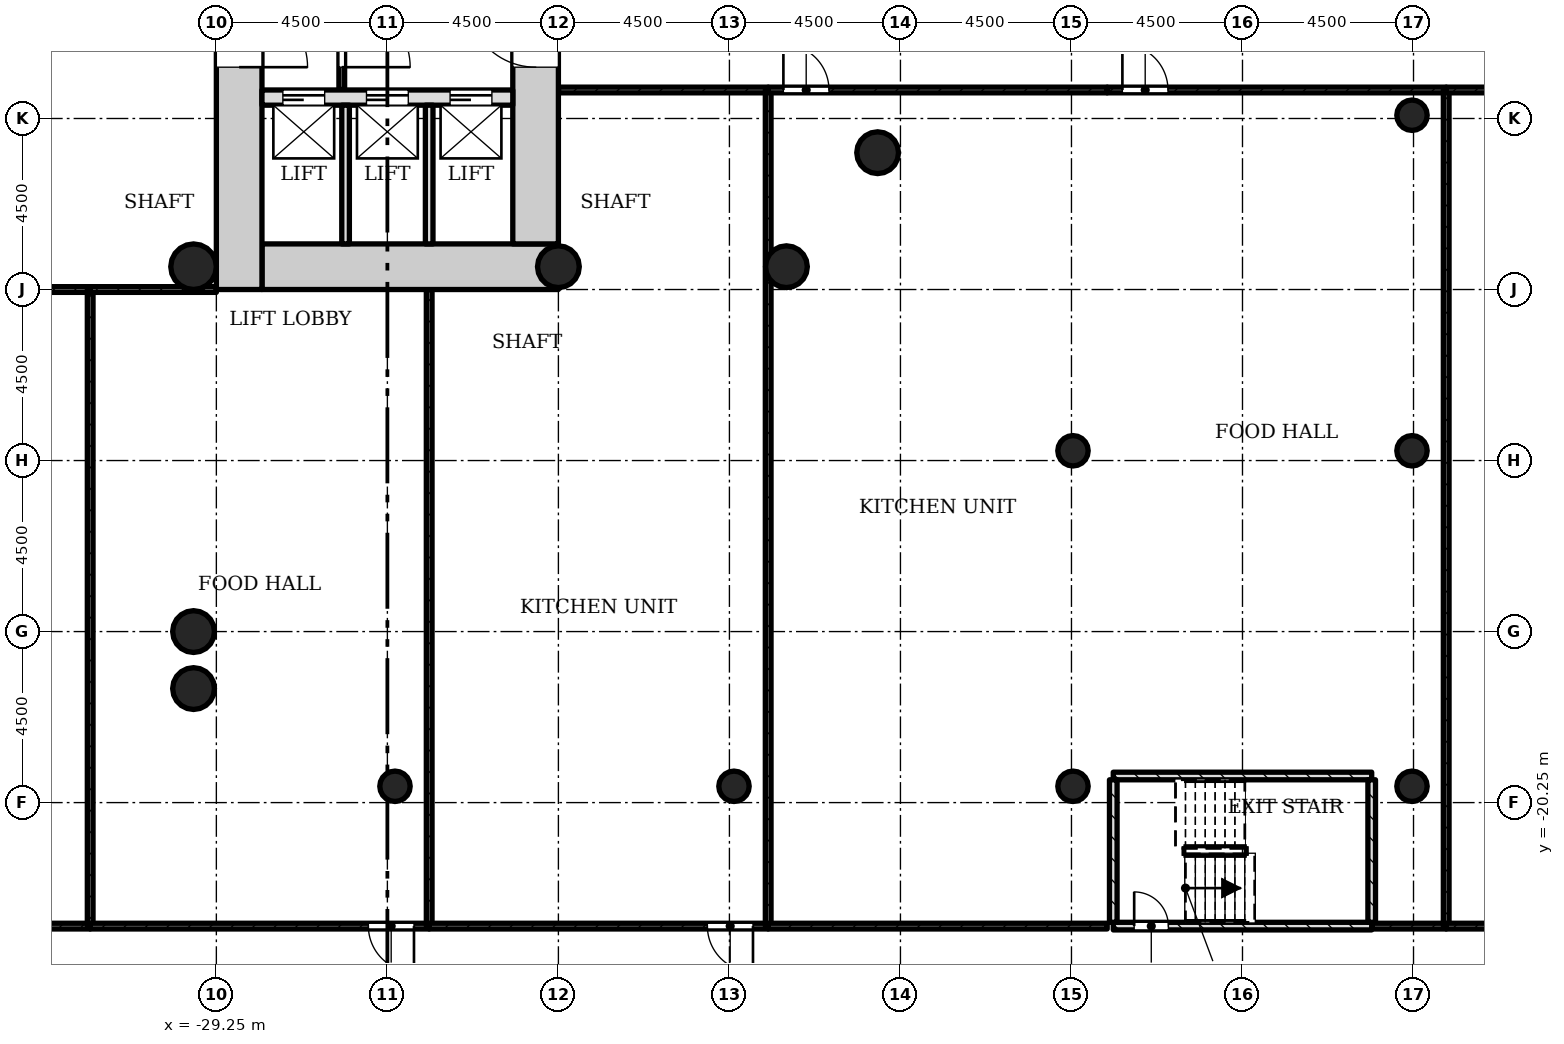
"""IFC4 building model, lengths in metres.
Left out: names, types, materials, properties, quantities, classifications, styles, units other than length and angle.
Written with IfcOpenShell. Run it as: python <this file> out.ifc"""

import sys

from ifc_helpers import new_model, si_unit, direction, frame, frame_2d, origin, origin_2d, place, context, subcontext, project, spatial, rectangle, hollow_circle, extrude, element, fill, save


model = new_model("IFC4")
c1 = context("Model", 3, precision=1e-05, world=origin(), true_north=direction((0.0, 1.0)))
c2 = subcontext(c1, "Body", "Model", "MODEL_VIEW")
j1 = project(units=[si_unit("LENGTHUNIT", "METRE"), si_unit("PLANEANGLEUNIT", "RADIAN")], contexts=[c1])
p1 = place(None, origin())
s1 = spatial("IfcSite", under=j1, at=p1, CompositionType="ELEMENT")
p2 = place(p1, origin())
s2 = spatial("IfcBuilding", under=s1, at=p2, CompositionType="ELEMENT")
p3 = place(p2, frame((0.0, 0.0, 6.0)))
s3 = spatial("IfcBuildingStorey", under=s2, at=p3, CompositionType="ELEMENT", Elevation=6.0)
p4 = place(p3, frame((-28.05, -6.15, 0.0), z_axis=(0.0, 0.0, 1.0), x_axis=(1.0, 0.0, 0.0)))
e1 = element("IfcWall", 1, at=p4, inside=s3, PredefinedType="SHEAR", context=c2, shape_type="SweptSolid", body=[
    extrude(rectangle(XDim=7.8, YDim=1.2, at=frame_2d((3.9, 0.0))), origin(), (0.0, 0.0, 1.0), 5.0),
])
p5 = place(p3, frame((-20.85, -5.55, 0.0), z_axis=(0.0, 0.0, 1.0), x_axis=(0.0, 1.0, 0.0)))
e2 = element("IfcWall", 2, at=p5, inside=s3, PredefinedType="SHEAR", context=c2, shape_type="SweptSolid", body=[
    extrude(rectangle(XDim=12.3, YDim=1.2, at=frame_2d((6.15, 0.0))), origin(), (0.0, 0.0, 1.0), 5.0),
])
p6 = place(p5, frame((4.65, 0.0, 0.0)))
e3 = element("IfcOpeningElement", 3, at=p6, cuts=e2, PredefinedType="OPENING", context=c2, shape_type="SweptSolid", body=[
    extrude(rectangle(XDim=1.8, YDim=2.1, at=frame_2d((0.9, 1.05))), frame((0.0, 0.61, 0.0), z_axis=(0.0, -1.0, 0.0), x_axis=(1.0, 0.0, 0.0)), (0.0, 0.0, 1.0), 1.22),
])
p7 = place(p3, frame((-28.65, 5.55, 0.0), z_axis=(0.0, 0.0, 1.0), x_axis=(0.0, -1.0, 0.0)))
e4 = element("IfcWall", 4, at=p7, inside=s3, PredefinedType="SHEAR", context=c2, shape_type="SweptSolid", body=[
    extrude(rectangle(XDim=12.3, YDim=1.2, at=frame_2d((6.15, 0.0))), origin(), (0.0, 0.0, 1.0), 5.0),
])
p8 = place(p7, frame((4.65, 0.0, 0.0)))
e5 = element("IfcOpeningElement", 5, at=p8, cuts=e4, PredefinedType="OPENING", context=c2, shape_type="SweptSolid", body=[
    extrude(rectangle(XDim=1.8, YDim=2.1, at=frame_2d((0.9, 1.05))), frame((0.0, 0.61, 0.0), z_axis=(0.0, -1.0, 0.0), x_axis=(1.0, 0.0, 0.0)), (0.0, 0.0, 1.0), 1.22),
])
p9 = place(p3, frame((-28.05, -1.7, 0.0), z_axis=(0.0, 0.0, 1.0), x_axis=(1.0, 0.0, 0.0)))
e6 = element("IfcWall", 6, at=p9, inside=s3, PredefinedType="SHEAR", context=c2, shape_type="SweptSolid", body=[
    extrude(rectangle(XDim=6.6, YDim=0.4, at=frame_2d((3.3, 0.0))), origin(), (0.0, 0.0, 1.0), 5.0),
])
p10 = place(p9, frame((0.55, 0.0, 0.0)))
e7 = element("IfcOpeningElement", 7, at=p10, cuts=e6, PredefinedType="OPENING", context=c2, shape_type="SweptSolid", body=[
    extrude(rectangle(XDim=1.1, YDim=2.1, at=frame_2d((0.55, 1.05))), frame((0.0, 0.21, 0.0), z_axis=(0.0, -1.0, 0.0), x_axis=(1.0, 0.0, 0.0)), (0.0, 0.0, 1.0), 0.42),
])
p11 = place(p9, frame((2.75, 0.0, 0.0)))
e8 = element("IfcOpeningElement", 8, at=p11, cuts=e6, PredefinedType="OPENING", context=c2, shape_type="SweptSolid", body=[
    extrude(rectangle(XDim=1.1, YDim=2.1, at=frame_2d((0.55, 1.05))), frame((0.0, 0.21, 0.0), z_axis=(0.0, -1.0, 0.0), x_axis=(1.0, 0.0, 0.0)), (0.0, 0.0, 1.0), 0.42),
])
p12 = place(p9, frame((4.95, 0.0, 0.0)))
e9 = element("IfcOpeningElement", 9, at=p12, cuts=e6, PredefinedType="OPENING", context=c2, shape_type="SweptSolid", body=[
    extrude(rectangle(XDim=1.1, YDim=2.1, at=frame_2d((0.55, 1.05))), frame((0.0, 0.21, 0.0), z_axis=(0.0, -1.0, 0.0), x_axis=(1.0, 0.0, 0.0)), (0.0, 0.0, 1.0), 0.42),
])
for number, where, z_axis, x_axis in (
    (10, (-20.25, -6.15, 0.0), (0.0, 0.0, 1.0), (1.0, 0.0, 0.0)),
    (11, (-14.25, -6.15, 0.0), (0.0, 0.0, 1.0), (1.0, 0.0, 0.0)),
    (12, (-11.85, -3.15, 0.0), (0.0, 0.0, 1.0), (1.0, 0.0, 0.0)),
    (13, (-29.85, -15.75, 0.0), (0.0, 0.0, 1.0), (1.0, 0.0, 0.0)),
    (14, (-29.85, -17.25, 0.0), (0.0, 0.0, 1.0), (1.0, 0.0, 0.0)),
):
    element("IfcColumn", number, at=place(p3, frame(where, z_axis=z_axis, x_axis=x_axis)), inside=s3, PredefinedType="COLUMN", context=c2, shape_type="SweptSolid", body=[
        extrude(hollow_circle(Radius=0.55, WallThickness=0.04, at=origin_2d()), origin(), (0.0, 0.0, 1.0), 5.0),
    ])
p13 = place(p3, frame((-29.85, -6.15, 0.0), z_axis=(0.0, 0.0, 1.0), x_axis=(1.0, 0.0, 0.0)))
e15 = element("IfcColumn", 15, at=p13, inside=s3, PredefinedType="COLUMN", context=c2, shape_type="SweptSolid", body=[
    extrude(hollow_circle(Radius=0.6, WallThickness=0.045, at=origin_2d()), origin(), (0.0, 0.0, 1.0), 5.0),
])
for number, where, z_axis, x_axis in (
    (16, (-24.55, -19.821, 0.0), (0.0, 0.0, 1.0), (1.0, 0.0, 0.0)),
    (17, (-15.63, -19.821, 0.0), (0.0, 0.0, 1.0), (1.0, 0.0, 0.0)),
    (18, (-6.71, -19.821, 0.0), (0.0, 0.0, 1.0), (1.0, 0.0, 0.0)),
    (19, (2.21, -19.821, 0.0), (0.0, 0.0, 1.0), (1.0, 0.0, 0.0)),
    (20, (-6.71, -10.993, 0.0), (0.0, 0.0, 1.0), (1.0, 0.0, 0.0)),
    (21, (2.21, -10.993, 0.0), (0.0, 0.0, 1.0), (1.0, 0.0, 0.0)),
    (22, (2.21, -2.164, 0.0), (0.0, 0.0, 1.0), (1.0, 0.0, 0.0)),
):
    element("IfcColumn", number, at=place(p3, frame(where, z_axis=z_axis, x_axis=x_axis)), inside=s3, PredefinedType="COLUMN", context=c2, shape_type="SweptSolid", body=[
        extrude(hollow_circle(Radius=0.4, WallThickness=0.028, at=origin_2d()), origin(), (0.0, 0.0, 1.0), 5.0),
    ])
p14 = place(p3, frame((-25.95, -1.5, 0.0), z_axis=(0.0, 0.0, 1.0), x_axis=(0.0, 1.0, 0.0)))
e23 = element("IfcWall", 23, at=p14, inside=s3, PredefinedType="PARTITIONING", context=c2, shape_type="SweptSolid", body=[
    extrude(rectangle(XDim=3.0, YDim=0.15, at=frame_2d((1.5, 0.0))), origin(), (0.0, 0.0, 1.0), 4.58),
])
p15 = place(p14, frame((0.6, 0.0, 0.0)))
e24 = element("IfcOpeningElement", 24, at=p15, cuts=e23, PredefinedType="OPENING", context=c2, shape_type="SweptSolid", body=[
    extrude(rectangle(XDim=1.8, YDim=2.1, at=frame_2d((0.9, 1.05))), frame((0.0, 0.085, 0.0), z_axis=(0.0, -1.0, 0.0), x_axis=(1.0, 0.0, 0.0)), (0.0, 0.0, 1.0), 0.17),
])
for number, where, z_axis, x_axis in (
    (25, (-25.85, -5.55, 0.0), (0.0, 0.0, 1.0), (0.0, 1.0, 0.0)),
    (26, (-23.65, -5.55, 0.0), (0.0, 0.0, 1.0), (0.0, 1.0, 0.0)),
):
    element("IfcWall", number, at=place(p3, frame(where, z_axis=z_axis, x_axis=x_axis)), inside=s3, PredefinedType="SOLIDWALL", context=c2, shape_type="SweptSolid", body=[
        extrude(rectangle(XDim=3.65, YDim=0.2, at=frame_2d((1.825, 0.0))), origin(), (0.0, 0.0, 1.0), 4.58),
    ])
p16 = place(p3, frame((-41.49, -6.75, 0.0), z_axis=(0.0, 0.0, 1.0), x_axis=(1.0, 0.0, 0.0)))
e27 = element("IfcWall", 27, at=p16, inside=s3, PredefinedType="PARTITIONING", context=c2, shape_type="SweptSolid", body=[
    extrude(rectangle(XDim=8.92, YDim=0.15, at=frame_2d((4.46, 0.0))), origin(), (0.0, 0.0, 1.0), 4.58),
])
p17 = place(p16, frame((1.0, 0.0, 0.0)))
e28 = element("IfcOpeningElement", 28, at=p17, cuts=e27, PredefinedType="OPENING", context=c2, shape_type="SweptSolid", body=[
    extrude(rectangle(XDim=1.2, YDim=2.1, at=frame_2d((0.6, 1.05))), frame((0.0, 0.085, 0.0), z_axis=(0.0, -1.0, 0.0), x_axis=(1.0, 0.0, 0.0)), (0.0, 0.0, 1.0), 0.17),
])
p18 = place(p3, frame((-32.57, -23.5, 0.0), z_axis=(0.0, 0.0, 1.0), x_axis=(-1.0, 0.0, 0.0)))
e29 = element("IfcWall", 29, at=p18, inside=s3, PredefinedType="PARTITIONING", context=c2, shape_type="SweptSolid", body=[
    extrude(rectangle(XDim=8.92, YDim=0.15, at=frame_2d((4.46, 0.0))), origin(), (0.0, 0.0, 1.0), 4.58),
])
p19 = place(p3, frame((-32.57, -6.75, 0.0), z_axis=(0.0, 0.0, 1.0), x_axis=(0.0, -1.0, 0.0)))
e30 = element("IfcWall", 30, at=p19, inside=s3, PredefinedType="PARTITIONING", context=c2, shape_type="SweptSolid", body=[
    extrude(rectangle(XDim=16.75, YDim=0.15, at=frame_2d((8.375, 0.0))), origin(), (0.0, 0.0, 1.0), 4.58),
])
p20 = place(p3, frame((-32.57, -6.75, 0.0), z_axis=(0.0, 0.0, 1.0), x_axis=(1.0, 0.0, 0.0)))
e31 = element("IfcWall", 31, at=p20, inside=s3, PredefinedType="PARTITIONING", context=c2, shape_type="SweptSolid", body=[
    extrude(rectangle(XDim=3.32, YDim=0.15, at=frame_2d((1.66, 0.0))), origin(), (0.0, 0.0, 1.0), 4.58),
])
p21 = place(p3, frame((-23.65, -23.5, 0.0), z_axis=(0.0, 0.0, 1.0), x_axis=(-1.0, 0.0, 0.0)))
e32 = element("IfcWall", 32, at=p21, inside=s3, PredefinedType="PARTITIONING", context=c2, shape_type="SweptSolid", body=[
    extrude(rectangle(XDim=8.92, YDim=0.15, at=frame_2d((4.46, 0.0))), origin(), (0.0, 0.0, 1.0), 4.58),
])
p22 = place(p21, frame((0.4, 0.0, 0.0)))
e33 = element("IfcOpeningElement", 33, at=p22, cuts=e32, PredefinedType="OPENING", context=c2, shape_type="SweptSolid", body=[
    extrude(rectangle(XDim=1.2, YDim=2.1, at=frame_2d((0.6, 1.05))), frame((0.0, 0.085, 0.0), z_axis=(0.0, -1.0, 0.0), x_axis=(1.0, 0.0, 0.0)), (0.0, 0.0, 1.0), 0.17),
])
p23 = place(p3, frame((-23.65, -6.75, 0.0), z_axis=(0.0, 0.0, 1.0), x_axis=(0.0, -1.0, 0.0)))
e34 = element("IfcWall", 34, at=p23, inside=s3, PredefinedType="PARTITIONING", context=c2, shape_type="SweptSolid", body=[
    extrude(rectangle(XDim=16.75, YDim=0.15, at=frame_2d((8.375, 0.0))), origin(), (0.0, 0.0, 1.0), 4.58),
])
p24 = place(p3, frame((-20.25, -1.5, 0.0), z_axis=(0.0, 0.0, 1.0), x_axis=(1.0, 0.0, 0.0)))
e35 = element("IfcWall", 35, at=p24, inside=s3, PredefinedType="PARTITIONING", context=c2, shape_type="SweptSolid", body=[
    extrude(rectangle(XDim=5.52, YDim=0.15, at=frame_2d((2.76, 0.0))), origin(), (0.0, 0.0, 1.0), 4.58),
])
p25 = place(p3, frame((-14.73, -23.5, 0.0), z_axis=(0.0, 0.0, 1.0), x_axis=(-1.0, 0.0, 0.0)))
e36 = element("IfcWall", 36, at=p25, inside=s3, PredefinedType="PARTITIONING", context=c2, shape_type="SweptSolid", body=[
    extrude(rectangle(XDim=8.92, YDim=0.15, at=frame_2d((4.46, 0.0))), origin(), (0.0, 0.0, 1.0), 4.58),
])
p26 = place(p25, frame((0.4, 0.0, 0.0)))
e37 = element("IfcOpeningElement", 37, at=p26, cuts=e36, PredefinedType="OPENING", context=c2, shape_type="SweptSolid", body=[
    extrude(rectangle(XDim=1.2, YDim=2.1, at=frame_2d((0.6, 1.05))), frame((0.0, 0.085, 0.0), z_axis=(0.0, -1.0, 0.0), x_axis=(1.0, 0.0, 0.0)), (0.0, 0.0, 1.0), 0.17),
])
p27 = place(p3, frame((-14.73, -1.5, 0.0), z_axis=(0.0, 0.0, 1.0), x_axis=(0.0, -1.0, 0.0)))
e38 = element("IfcWall", 38, at=p27, inside=s3, PredefinedType="PARTITIONING", context=c2, shape_type="SweptSolid", body=[
    extrude(rectangle(XDim=22.0, YDim=0.15, at=frame_2d((11.0, 0.0))), origin(), (0.0, 0.0, 1.0), 4.58),
])
p28 = place(p3, frame((-14.73, -1.5, 0.0), z_axis=(0.0, 0.0, 1.0), x_axis=(1.0, 0.0, 0.0)))
e39 = element("IfcWall", 39, at=p28, inside=s3, PredefinedType="PARTITIONING", context=c2, shape_type="SweptSolid", body=[
    extrude(rectangle(XDim=8.92, YDim=0.15, at=frame_2d((4.46, 0.0))), origin(), (0.0, 0.0, 1.0), 4.58),
])
p29 = place(p28, frame((0.4, 0.0, 0.0)))
e40 = element("IfcOpeningElement", 40, at=p29, cuts=e39, PredefinedType="OPENING", context=c2, shape_type="SweptSolid", body=[
    extrude(rectangle(XDim=1.2, YDim=2.1, at=frame_2d((0.6, 1.05))), frame((0.0, 0.085, 0.0), z_axis=(0.0, -1.0, 0.0), x_axis=(1.0, 0.0, 0.0)), (0.0, 0.0, 1.0), 0.17),
])
p30 = place(p3, frame((-5.81, -23.5, 0.0), z_axis=(0.0, 0.0, 1.0), x_axis=(-1.0, 0.0, 0.0)))
e41 = element("IfcWall", 41, at=p30, inside=s3, PredefinedType="PARTITIONING", context=c2, shape_type="SweptSolid", body=[
    extrude(rectangle(XDim=8.92, YDim=0.15, at=frame_2d((4.46, 0.0))), origin(), (0.0, 0.0, 1.0), 4.58),
])
p31 = place(p3, frame((-5.65, -23.5, 0.0), z_axis=(0.0, 0.0, 1.0), x_axis=(1.0, 0.0, 0.0)))
e42 = element("IfcWall", 42, at=p31, inside=s3, PredefinedType="SHEAR", context=c2, shape_type="SweptSolid", body=[
    extrude(rectangle(XDim=6.8, YDim=0.2, at=frame_2d((3.4, 0.0))), origin(), (0.0, 0.0, 1.0), 4.58),
])
p32 = place(p31, frame((0.55, 0.0, 0.0)))
e43 = element("IfcOpeningElement", 43, at=p32, cuts=e42, PredefinedType="OPENING", context=c2, shape_type="SweptSolid", body=[
    extrude(rectangle(XDim=0.9, YDim=2.1, at=frame_2d((0.45, 1.05))), frame((0.0, 0.11, 0.0), z_axis=(0.0, -1.0, 0.0), x_axis=(1.0, 0.0, 0.0)), (0.0, 0.0, 1.0), 0.22),
])
p33 = place(p3, frame((-5.65, -19.55, 0.0), z_axis=(0.0, 0.0, 1.0), x_axis=(1.0, 0.0, 0.0)))
e44 = element("IfcWall", 44, at=p33, inside=s3, PredefinedType="SHEAR", context=c2, shape_type="SweptSolid", body=[
    extrude(rectangle(XDim=6.8, YDim=0.2, at=frame_2d((3.4, 0.0))), origin(), (0.0, 0.0, 1.0), 4.58),
])
for number, where, z_axis, x_axis in (
    (45, (-5.65, -23.4, 0.0), (0.0, 0.0, 1.0), (0.0, 1.0, 0.0)),
    (46, (1.15, -23.4, 0.0), (0.0, 0.0, 1.0), (0.0, 1.0, 0.0)),
):
    element("IfcWall", number, at=place(p3, frame(where, z_axis=z_axis, x_axis=x_axis)), inside=s3, PredefinedType="SHEAR", context=c2, shape_type="SweptSolid", body=[
        extrude(rectangle(XDim=3.75, YDim=0.2, at=frame_2d((1.875, 0.0))), origin(), (0.0, 0.0, 1.0), 4.58),
    ])
p34 = place(p3, frame((-5.81, -1.5, 0.0), z_axis=(0.0, 0.0, 1.0), x_axis=(1.0, 0.0, 0.0)))
e47 = element("IfcWall", 47, at=p34, inside=s3, PredefinedType="PARTITIONING", context=c2, shape_type="SweptSolid", body=[
    extrude(rectangle(XDim=8.92, YDim=0.15, at=frame_2d((4.46, 0.0))), origin(), (0.0, 0.0, 1.0), 4.58),
])
p35 = place(p34, frame((0.4, 0.0, 0.0)))
e48 = element("IfcOpeningElement", 48, at=p35, cuts=e47, PredefinedType="OPENING", context=c2, shape_type="SweptSolid", body=[
    extrude(rectangle(XDim=1.2, YDim=2.1, at=frame_2d((0.6, 1.05))), frame((0.0, 0.085, 0.0), z_axis=(0.0, -1.0, 0.0), x_axis=(1.0, 0.0, 0.0)), (0.0, 0.0, 1.0), 0.17),
])
p36 = place(p3, frame((3.11, -23.5, 0.0), z_axis=(0.0, 0.0, 1.0), x_axis=(-1.0, 0.0, 0.0)))
e49 = element("IfcWall", 49, at=p36, inside=s3, PredefinedType="PARTITIONING", context=c2, shape_type="SweptSolid", body=[
    extrude(rectangle(XDim=1.96, YDim=0.15, at=frame_2d((0.98, 0.0))), origin(), (0.0, 0.0, 1.0), 4.58),
])
p37 = place(p3, frame((3.11, -1.5, 0.0), z_axis=(0.0, 0.0, 1.0), x_axis=(0.0, -1.0, 0.0)))
e50 = element("IfcWall", 50, at=p37, inside=s3, PredefinedType="PARTITIONING", context=c2, shape_type="SweptSolid", body=[
    extrude(rectangle(XDim=22.0, YDim=0.15, at=frame_2d((11.0, 0.0))), origin(), (0.0, 0.0, 1.0), 4.58),
])
p38 = place(p3, frame((12.03, -23.5, 0.0), z_axis=(0.0, 0.0, 1.0), x_axis=(-1.0, 0.0, 0.0)))
e51 = element("IfcWall", 51, at=p38, inside=s3, PredefinedType="PARTITIONING", context=c2, shape_type="SweptSolid", body=[
    extrude(rectangle(XDim=8.92, YDim=0.15, at=frame_2d((4.46, 0.0))), origin(), (0.0, 0.0, 1.0), 4.58),
])
p39 = place(p38, frame((0.4, 0.0, 0.0)))
e52 = element("IfcOpeningElement", 52, at=p39, cuts=e51, PredefinedType="OPENING", context=c2, shape_type="SweptSolid", body=[
    extrude(rectangle(XDim=1.2, YDim=2.1, at=frame_2d((0.6, 1.05))), frame((0.0, 0.085, 0.0), z_axis=(0.0, -1.0, 0.0), x_axis=(1.0, 0.0, 0.0)), (0.0, 0.0, 1.0), 0.17),
])
p40 = place(p3, frame((3.11, -1.5, 0.0), z_axis=(0.0, 0.0, 1.0), x_axis=(1.0, 0.0, 0.0)))
e53 = element("IfcWall", 53, at=p40, inside=s3, PredefinedType="PARTITIONING", context=c2, shape_type="SweptSolid", body=[
    extrude(rectangle(XDim=8.92, YDim=0.15, at=frame_2d((4.46, 0.0))), origin(), (0.0, 0.0, 1.0), 4.58),
])
p41 = place(p15, origin())
e54 = element("IfcDoor", 54, at=p41, inside=s3, OperationType="SINGLE_SWING_LEFT", PredefinedType="DOOR", context=c2, shape_type="SweptSolid", body=[
    extrude(rectangle(XDim=1.8, YDim=2.1, at=frame_2d((0.9, 1.05))), frame((0.0, 0.025, 0.0), z_axis=(0.0, -1.0, 0.0), x_axis=(1.0, 0.0, 0.0)), (0.0, 0.0, 1.0), 0.05),
])
fill(e24, e54)
p42 = place(p22, origin())
e55 = element("IfcDoor", 55, at=p42, inside=s3, OperationType="SINGLE_SWING_RIGHT", PredefinedType="DOOR", context=c2, shape_type="SweptSolid", body=[
    extrude(rectangle(XDim=1.2, YDim=2.1, at=frame_2d((0.6, 1.05))), frame((0.0, 0.025, 0.0), z_axis=(0.0, -1.0, 0.0), x_axis=(1.0, 0.0, 0.0)), (0.0, 0.0, 1.0), 0.05),
])
fill(e33, e55)
p43 = place(p26, origin())
e56 = element("IfcDoor", 56, at=p43, inside=s3, OperationType="SINGLE_SWING_RIGHT", PredefinedType="DOOR", context=c2, shape_type="SweptSolid", body=[
    extrude(rectangle(XDim=1.2, YDim=2.1, at=frame_2d((0.6, 1.05))), frame((0.0, 0.025, 0.0), z_axis=(0.0, -1.0, 0.0), x_axis=(1.0, 0.0, 0.0)), (0.0, 0.0, 1.0), 0.05),
])
fill(e37, e56)
p44 = place(p29, origin())
e57 = element("IfcDoor", 57, at=p44, inside=s3, OperationType="SINGLE_SWING_RIGHT", PredefinedType="DOOR", context=c2, shape_type="SweptSolid", body=[
    extrude(rectangle(XDim=1.2, YDim=2.1, at=frame_2d((0.6, 1.05))), frame((0.0, 0.025, 0.0), z_axis=(0.0, -1.0, 0.0), x_axis=(1.0, 0.0, 0.0)), (0.0, 0.0, 1.0), 0.05),
])
fill(e40, e57)
p45 = place(p32, origin())
e58 = element("IfcDoor", 58, at=p45, inside=s3, OperationType="SINGLE_SWING_RIGHT", PredefinedType="DOOR", context=c2, shape_type="SweptSolid", body=[
    extrude(rectangle(XDim=0.9, YDim=2.1, at=frame_2d((0.45, 1.05))), frame((0.0, 0.025, 0.0), z_axis=(0.0, -1.0, 0.0), x_axis=(1.0, 0.0, 0.0)), (0.0, 0.0, 1.0), 0.05),
])
fill(e43, e58)
p46 = place(p10, origin())
e59 = element("IfcDoor", 59, at=p46, inside=s3, OperationType="SLIDING_TO_LEFT", PredefinedType="DOOR", context=c2, shape_type="SweptSolid", body=[
    extrude(rectangle(XDim=1.1, YDim=2.1, at=frame_2d((0.55, 1.05))), frame((0.0, 0.025, 0.0), z_axis=(0.0, -1.0, 0.0), x_axis=(1.0, 0.0, 0.0)), (0.0, 0.0, 1.0), 0.05),
])
fill(e7, e59)
p47 = place(p11, origin())
e60 = element("IfcDoor", 60, at=p47, inside=s3, OperationType="SLIDING_TO_LEFT", PredefinedType="DOOR", context=c2, shape_type="SweptSolid", body=[
    extrude(rectangle(XDim=1.1, YDim=2.1, at=frame_2d((0.55, 1.05))), frame((0.0, 0.025, 0.0), z_axis=(0.0, -1.0, 0.0), x_axis=(1.0, 0.0, 0.0)), (0.0, 0.0, 1.0), 0.05),
])
fill(e8, e60)
p48 = place(p12, origin())
e61 = element("IfcDoor", 61, at=p48, inside=s3, OperationType="SLIDING_TO_LEFT", PredefinedType="DOOR", context=c2, shape_type="SweptSolid", body=[
    extrude(rectangle(XDim=1.1, YDim=2.1, at=frame_2d((0.55, 1.05))), frame((0.0, 0.025, 0.0), z_axis=(0.0, -1.0, 0.0), x_axis=(1.0, 0.0, 0.0)), (0.0, 0.0, 1.0), 0.05),
])
fill(e9, e61)
p49 = place(p8, origin())
e62 = element("IfcDoor", 62, at=p49, inside=s3, OperationType="SINGLE_SWING_LEFT", PredefinedType="DOOR", context=c2, shape_type="SweptSolid", body=[
    extrude(rectangle(XDim=1.8, YDim=2.1, at=frame_2d((0.9, 1.05))), frame((0.0, 0.025, 0.0), z_axis=(0.0, -1.0, 0.0), x_axis=(1.0, 0.0, 0.0)), (0.0, 0.0, 1.0), 0.05),
])
fill(e5, e62)
p50 = place(p6, origin())
e63 = element("IfcDoor", 63, at=p50, inside=s3, OperationType="SINGLE_SWING_LEFT", PredefinedType="DOOR", context=c2, shape_type="SweptSolid", body=[
    extrude(rectangle(XDim=1.8, YDim=2.1, at=frame_2d((0.9, 1.05))), frame((0.0, 0.025, 0.0), z_axis=(0.0, -1.0, 0.0), x_axis=(1.0, 0.0, 0.0)), (0.0, 0.0, 1.0), 0.05),
])
fill(e3, e63)
p51 = place(p35, origin())
e64 = element("IfcDoor", 64, at=p51, inside=s3, OperationType="SINGLE_SWING_RIGHT", PredefinedType="DOOR", context=c2, shape_type="SweptSolid", body=[
    extrude(rectangle(XDim=1.2, YDim=2.1, at=frame_2d((0.6, 1.05))), frame((0.0, 0.025, 0.0), z_axis=(0.0, -1.0, 0.0), x_axis=(1.0, 0.0, 0.0)), (0.0, 0.0, 1.0), 0.05),
])
fill(e48, e64)
save(model, sys.argv[1])
